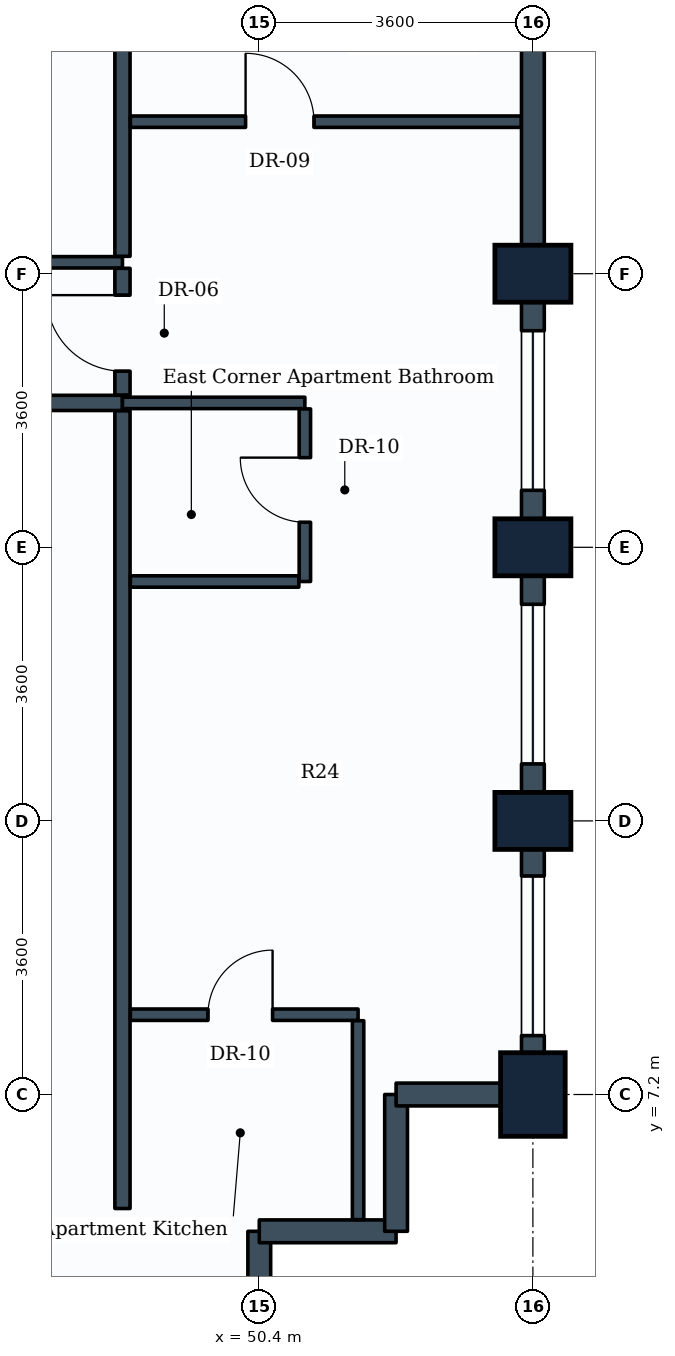
"""IFC4 building model, lengths in metres.
Left out: names, types, materials, properties, quantities, classifications, styles, units other than length and angle.
Written with IfcOpenShell. Run it as: python <this file> out.ifc"""

import sys

from ifc_helpers import new_model, si_unit, direction, frame, frame_2d, origin, origin_2d, place, context, subcontext, project, spatial, rectangle, extrude, element, fill, save


model = new_model("IFC4")
c1 = context("Model", 3, precision=1e-05, world=origin(), true_north=direction((0.0, 1.0)))
c2 = subcontext(c1, "Body", "Model", "MODEL_VIEW")
j1 = project(units=[si_unit("LENGTHUNIT", "METRE"), si_unit("PLANEANGLEUNIT", "RADIAN")], contexts=[c1])
p1 = place(None, origin())
s1 = spatial("IfcSite", under=j1, at=p1, CompositionType="ELEMENT")
p2 = place(p1, origin())
s2 = spatial("IfcBuilding", under=s1, at=p2, CompositionType="ELEMENT")
p3 = place(p2, frame((0.0, 0.0, 131.4)))
s3 = spatial("IfcBuildingStorey", under=s2, at=p3, CompositionType="ELEMENT", Elevation=131.4)
p4 = place(p3, frame((54.0, 7.2, 0.0), z_axis=(0.0, 0.0, 1.0), x_axis=(1.0, 0.0, 0.0)))
e1 = element("IfcColumn", 1, at=p4, inside=s3, PredefinedType="COLUMN", context=c2, shape_type="SweptSolid", body=[
    extrude(rectangle(XDim=0.85, YDim=1.1, at=origin_2d()), origin(), (0.0, 0.0, 1.0), 3.8),
])
for number, where, z_axis, x_axis in (
    (2, (54.0, 10.8, 0.0), (0.0, 0.0, 1.0), (0.0, 1.0, 0.0)),
    (3, (54.0, 14.4, 0.0), (0.0, 0.0, 1.0), (0.0, 1.0, 0.0)),
    (4, (54.0, 18.0, 0.0), (0.0, 0.0, 1.0), (0.0, 1.0, 0.0)),
):
    element("IfcColumn", number, at=place(p3, frame(where, z_axis=z_axis, x_axis=x_axis)), inside=s3, PredefinedType="COLUMN", context=c2, shape_type="SweptSolid", body=[
        extrude(rectangle(XDim=0.75, YDim=1.0, at=origin_2d()), origin(), (0.0, 0.0, 1.0), 3.8),
    ])
p5 = place(p3, frame((50.4, 5.4, 0.0), z_axis=(0.0, 0.0, 1.0), x_axis=(0.0, -1.0, 0.0)))
e5 = element("IfcWall", 5, at=p5, inside=s3, PredefinedType="STANDARD", context=c2, shape_type="SweptSolid", body=[
    extrude(rectangle(XDim=1.8, YDim=0.3, at=frame_2d((0.9, 0.0))), origin(), (0.0, 0.0, 1.0), 2.93),
])
for number, where, z_axis, x_axis in (
    (6, (52.2, 5.4, 0.0), (0.0, 0.0, 1.0), (-1.0, 0.0, 0.0)),
    (7, (52.2, 7.2, 0.0), (0.0, 0.0, 1.0), (0.0, -1.0, 0.0)),
):
    element("IfcWall", number, at=place(p3, frame(where, z_axis=z_axis, x_axis=x_axis)), inside=s3, PredefinedType="STANDARD", context=c2, shape_type="SweptSolid", body=[
        extrude(rectangle(XDim=1.8, YDim=0.3, at=frame_2d((0.9, 0.0))), origin(), (0.0, 0.0, 1.0), 3.535),
    ])
p6 = place(p3, frame((54.0, 7.2, 0.0), z_axis=(0.0, 0.0, 1.0), x_axis=(-1.0, 0.0, 0.0)))
e8 = element("IfcWall", 8, at=p6, inside=s3, PredefinedType="STANDARD", context=c2, shape_type="SweptSolid", body=[
    extrude(rectangle(XDim=1.8, YDim=0.3, at=frame_2d((0.9, 0.0))), origin(), (0.0, 0.0, 1.0), 2.93),
])
p7 = place(p3, frame((54.0, 10.8, 0.0), z_axis=(0.0, 0.0, 1.0), x_axis=(0.0, -1.0, 0.0)))
e9 = element("IfcWall", 9, at=p7, inside=s3, PredefinedType="STANDARD", context=c2, shape_type="SweptSolid", body=[
    extrude(rectangle(XDim=3.6, YDim=0.3, at=frame_2d((1.8, 0.0))), origin(), (0.0, 0.0, 1.0), 2.93),
])
p8 = place(p7, frame((0.725, 0.0, 0.85)))
e10 = element("IfcOpeningElement", 10, at=p8, cuts=e9, PredefinedType="OPENING", context=c2, shape_type="SweptSolid", body=[
    extrude(rectangle(XDim=2.1, YDim=1.35, at=frame_2d((1.05, 0.675))), frame((0.0, 0.16, 0.0), z_axis=(0.0, -1.0, 0.0), x_axis=(1.0, 0.0, 0.0)), (0.0, 0.0, 1.0), 0.32),
])
p9 = place(p3, frame((54.0, 14.4, 0.0), z_axis=(0.0, 0.0, 1.0), x_axis=(0.0, -1.0, 0.0)))
e11 = element("IfcWall", 11, at=p9, inside=s3, PredefinedType="STANDARD", context=c2, shape_type="SweptSolid", body=[
    extrude(rectangle(XDim=3.6, YDim=0.3, at=frame_2d((1.8, 0.0))), origin(), (0.0, 0.0, 1.0), 2.93),
])
p10 = place(p9, frame((0.75, 0.0, 0.85)))
e12 = element("IfcOpeningElement", 12, at=p10, cuts=e11, PredefinedType="OPENING", context=c2, shape_type="SweptSolid", body=[
    extrude(rectangle(XDim=2.1, YDim=1.35, at=frame_2d((1.05, 0.675))), frame((0.0, 0.16, 0.0), z_axis=(0.0, -1.0, 0.0), x_axis=(1.0, 0.0, 0.0)), (0.0, 0.0, 1.0), 0.32),
])
p11 = place(p3, frame((54.0, 18.0, 0.0), z_axis=(0.0, 0.0, 1.0), x_axis=(0.0, -1.0, 0.0)))
e13 = element("IfcWall", 13, at=p11, inside=s3, PredefinedType="STANDARD", context=c2, shape_type="SweptSolid", body=[
    extrude(rectangle(XDim=3.6, YDim=0.3, at=frame_2d((1.8, 0.0))), origin(), (0.0, 0.0, 1.0), 2.93),
])
p12 = place(p11, frame((0.75, 0.0, 0.85)))
e14 = element("IfcOpeningElement", 14, at=p12, cuts=e13, PredefinedType="OPENING", context=c2, shape_type="SweptSolid", body=[
    extrude(rectangle(XDim=2.1, YDim=1.35, at=frame_2d((1.05, 0.675))), frame((0.0, 0.16, 0.0), z_axis=(0.0, -1.0, 0.0), x_axis=(1.0, 0.0, 0.0)), (0.0, 0.0, 1.0), 0.32),
])
p13 = place(p3, frame((54.0, 21.6, 0.0), z_axis=(0.0, 0.0, 1.0), x_axis=(0.0, -1.0, 0.0)))
e15 = element("IfcWall", 15, at=p13, inside=s3, PredefinedType="STANDARD", context=c2, shape_type="SweptSolid", body=[
    extrude(rectangle(XDim=3.6, YDim=0.3, at=frame_2d((1.8, 0.0))), origin(), (0.0, 0.0, 1.0), 2.93),
])
p14 = place(p3, frame((45.68, 16.3, 0.0), z_axis=(0.0, 0.0, 1.0), x_axis=(1.0, 0.0, 0.0)))
e16 = element("IfcWall", 16, at=p14, inside=s3, PredefinedType="PARTITIONING", context=c2, shape_type="SweptSolid", body=[
    extrude(rectangle(XDim=2.92, YDim=0.2, at=frame_2d((1.46, 0.0))), origin(), (0.0, 0.0, 1.0), 3.17),
])
p15 = place(p3, frame((43.904, 18.15, 0.0), z_axis=(0.0, 0.0, 1.0), x_axis=(1.0, 0.0, 0.0)))
e17 = element("IfcWall", 17, at=p15, inside=s3, PredefinedType="PARTITIONING", context=c2, shape_type="SweptSolid", body=[
    extrude(rectangle(XDim=4.696, YDim=0.15, at=frame_2d((2.348, 0.0))), origin(), (0.0, 0.0, 1.0), 3.17),
])
p16 = place(p15, frame((1.757, 0.0, 0.0)))
e18 = element("IfcOpeningElement", 18, at=p16, cuts=e17, PredefinedType="OPENING", context=c2, shape_type="SweptSolid", body=[
    extrude(rectangle(XDim=1.0, YDim=2.1, at=frame_2d((0.5, 1.05))), frame((0.0, 0.085, 0.0), z_axis=(0.0, -1.0, 0.0), x_axis=(1.0, 0.0, 0.0)), (0.0, 0.0, 1.0), 0.17),
])
p17 = place(p3, frame((48.6, 5.7, 0.0), z_axis=(0.0, 0.0, 1.0), x_axis=(0.0, 1.0, 0.0)))
e19 = element("IfcWall", 19, at=p17, inside=s3, PredefinedType="PARTITIONING", context=c2, shape_type="SweptSolid", body=[
    extrude(rectangle(XDim=10.496, YDim=0.2, at=frame_2d((5.248, 0.0))), origin(), (0.0, 0.0, 1.0), 3.17),
])
p18 = place(p3, frame((48.6, 18.229, 0.0), z_axis=(0.0, 0.0, 1.0), x_axis=(0.0, 1.0, 0.0)))
e20 = element("IfcWall", 20, at=p18, inside=s3, PredefinedType="PARTITIONING", context=c2, shape_type="SweptSolid", body=[
    extrude(rectangle(XDim=6.817, YDim=0.2, at=frame_2d((3.408, 0.0))), origin(), (0.0, 0.0, 1.0), 2.93),
])
p19 = place(p3, frame((48.6, 16.404, 0.0), z_axis=(0.0, 0.0, 1.0), x_axis=(0.0, 1.0, 0.0)))
e21 = element("IfcWall", 21, at=p19, inside=s3, PredefinedType="PARTITIONING", context=c2, shape_type="SweptSolid", body=[
    extrude(rectangle(XDim=1.667, YDim=0.2, at=frame_2d((0.833, 0.0))), origin(), (0.0, 0.0, 1.0), 3.535),
])
p20 = place(p19, frame((0.314, 0.0, 0.0)))
e22 = element("IfcOpeningElement", 22, at=p20, cuts=e21, PredefinedType="OPENING", context=c2, shape_type="SweptSolid", body=[
    extrude(rectangle(XDim=1.0, YDim=2.1, at=frame_2d((0.5, 1.05))), frame((0.0, 0.11, 0.0), z_axis=(0.0, -1.0, 0.0), x_axis=(1.0, 0.0, 0.0)), (0.0, 0.0, 1.0), 0.22),
])
p21 = place(p3, frame((48.6, 16.3, 0.0), z_axis=(0.0, 0.0, 1.0), x_axis=(1.0, 0.0, 0.0)))
e23 = element("IfcWall", 23, at=p21, inside=s3, PredefinedType="PARTITIONING", context=c2, shape_type="SweptSolid", body=[
    extrude(rectangle(XDim=2.4, YDim=0.15, at=frame_2d((1.2, 0.0))), origin(), (0.0, 0.0, 1.0), 3.535),
])
p22 = place(p3, frame((51.0, 13.95, 0.0), z_axis=(0.0, 0.0, 1.0), x_axis=(0.0, 1.0, 0.0)))
e24 = element("IfcWall", 24, at=p22, inside=s3, PredefinedType="PARTITIONING", context=c2, shape_type="SweptSolid", body=[
    extrude(rectangle(XDim=2.271, YDim=0.15, at=frame_2d((1.135, 0.0))), origin(), (0.0, 0.0, 1.0), 3.17),
])
p23 = place(p22, frame((0.78, 0.0, 0.0)))
e25 = element("IfcOpeningElement", 25, at=p23, cuts=e24, PredefinedType="OPENING", context=c2, shape_type="SweptSolid", body=[
    extrude(rectangle(XDim=0.85, YDim=2.1, at=frame_2d((0.425, 1.05))), frame((0.0, 0.085, 0.0), z_axis=(0.0, -1.0, 0.0), x_axis=(1.0, 0.0, 0.0)), (0.0, 0.0, 1.0), 0.17),
])
p24 = place(p3, frame((48.704, 13.95, 0.0), z_axis=(0.0, 0.0, 1.0), x_axis=(1.0, 0.0, 0.0)))
e26 = element("IfcWall", 26, at=p24, inside=s3, PredefinedType="PARTITIONING", context=c2, shape_type="SweptSolid", body=[
    extrude(rectangle(XDim=2.217, YDim=0.15, at=frame_2d((1.108, 0.0))), origin(), (0.0, 0.0, 1.0), 3.535),
])
p25 = place(p3, frame((48.704, 20.0, 0.0), z_axis=(0.0, 0.0, 1.0), x_axis=(1.0, 0.0, 0.0)))
e27 = element("IfcWall", 27, at=p25, inside=s3, PredefinedType="PARTITIONING", context=c2, shape_type="SweptSolid", body=[
    extrude(rectangle(XDim=5.142, YDim=0.15, at=frame_2d((2.571, 0.0))), origin(), (0.0, 0.0, 1.0), 2.93),
])
p26 = place(p25, frame((1.516, 0.0, 0.0)))
e28 = element("IfcOpeningElement", 28, at=p26, cuts=e27, PredefinedType="OPENING", context=c2, shape_type="SweptSolid", body=[
    extrude(rectangle(XDim=0.9, YDim=2.1, at=frame_2d((0.45, 1.05))), frame((0.0, 0.085, 0.0), z_axis=(0.0, -1.0, 0.0), x_axis=(1.0, 0.0, 0.0)), (0.0, 0.0, 1.0), 0.17),
])
p27 = place(p3, frame((48.704, 8.25, 0.0), z_axis=(0.0, 0.0, 1.0), x_axis=(1.0, 0.0, 0.0)))
e29 = element("IfcWall", 29, at=p27, inside=s3, PredefinedType="PARTITIONING", context=c2, shape_type="SweptSolid", body=[
    extrude(rectangle(XDim=2.996, YDim=0.15, at=frame_2d((1.498, 0.0))), origin(), (0.0, 0.0, 1.0), 3.535),
])
p28 = place(p27, frame((1.021, 0.0, 0.0)))
e30 = element("IfcOpeningElement", 30, at=p28, cuts=e29, PredefinedType="OPENING", context=c2, shape_type="SweptSolid", body=[
    extrude(rectangle(XDim=0.85, YDim=2.1, at=frame_2d((0.425, 1.05))), frame((0.0, 0.085, 0.0), z_axis=(0.0, -1.0, 0.0), x_axis=(1.0, 0.0, 0.0)), (0.0, 0.0, 1.0), 0.17),
])
p29 = place(p3, frame((51.7, 5.554, 0.0), z_axis=(0.0, 0.0, 1.0), x_axis=(0.0, 1.0, 0.0)))
e31 = element("IfcWall", 31, at=p29, inside=s3, PredefinedType="PARTITIONING", context=c2, shape_type="SweptSolid", body=[
    extrude(rectangle(XDim=2.617, YDim=0.15, at=frame_2d((1.309, 0.0))), origin(), (0.0, 0.0, 1.0), 3.535),
])
p30 = place(p8, origin())
e32 = element("IfcWindow", 32, at=p30, inside=s3, PartitioningType="SINGLE_PANEL", PredefinedType="WINDOW", context=c2, shape_type="SweptSolid", body=[
    extrude(rectangle(XDim=2.1, YDim=1.35, at=frame_2d((1.05, 0.675))), frame((0.0, 0.03, 0.0), z_axis=(0.0, -1.0, 0.0), x_axis=(1.0, 0.0, 0.0)), (0.0, 0.0, 1.0), 0.06),
])
fill(e10, e32)
p31 = place(p10, origin())
e33 = element("IfcWindow", 33, at=p31, inside=s3, PartitioningType="SINGLE_PANEL", PredefinedType="WINDOW", context=c2, shape_type="SweptSolid", body=[
    extrude(rectangle(XDim=2.1, YDim=1.35, at=frame_2d((1.05, 0.675))), frame((0.0, 0.03, 0.0), z_axis=(0.0, -1.0, 0.0), x_axis=(1.0, 0.0, 0.0)), (0.0, 0.0, 1.0), 0.06),
])
fill(e12, e33)
p32 = place(p12, origin())
e34 = element("IfcWindow", 34, at=p32, inside=s3, PartitioningType="SINGLE_PANEL", PredefinedType="WINDOW", context=c2, shape_type="SweptSolid", body=[
    extrude(rectangle(XDim=2.1, YDim=1.35, at=frame_2d((1.05, 0.675))), frame((0.0, 0.03, 0.0), z_axis=(0.0, -1.0, 0.0), x_axis=(1.0, 0.0, 0.0)), (0.0, 0.0, 1.0), 0.06),
])
fill(e14, e34)
p33 = place(p20, origin())
e35 = element("IfcDoor", 35, at=p33, inside=s3, OperationType="SINGLE_SWING_RIGHT", PredefinedType="DOOR", context=c2, shape_type="SweptSolid", body=[
    extrude(rectangle(XDim=1.0, YDim=2.1, at=frame_2d((0.5, 1.05))), frame((0.0, 0.025, 0.0), z_axis=(0.0, -1.0, 0.0), x_axis=(1.0, 0.0, 0.0)), (0.0, 0.0, 1.0), 0.05),
])
fill(e22, e35)
p34 = place(p23, origin())
e36 = element("IfcDoor", 36, at=p34, inside=s3, OperationType="SINGLE_SWING_RIGHT", PredefinedType="DOOR", context=c2, shape_type="SweptSolid", body=[
    extrude(rectangle(XDim=0.85, YDim=2.1, at=frame_2d((0.425, 1.05))), frame((0.0, 0.025, 0.0), z_axis=(0.0, -1.0, 0.0), x_axis=(1.0, 0.0, 0.0)), (0.0, 0.0, 1.0), 0.05),
])
fill(e25, e36)
p35 = place(p26, origin())
e37 = element("IfcDoor", 37, at=p35, inside=s3, OperationType="SINGLE_SWING_LEFT", PredefinedType="DOOR", context=c2, shape_type="SweptSolid", body=[
    extrude(rectangle(XDim=0.9, YDim=2.1, at=frame_2d((0.45, 1.05))), frame((0.0, 0.025, 0.0), z_axis=(0.0, -1.0, 0.0), x_axis=(1.0, 0.0, 0.0)), (0.0, 0.0, 1.0), 0.05),
])
fill(e28, e37)
p36 = place(p28, origin())
e38 = element("IfcDoor", 38, at=p36, inside=s3, OperationType="SINGLE_SWING_RIGHT", PredefinedType="DOOR", context=c2, shape_type="SweptSolid", body=[
    extrude(rectangle(XDim=0.85, YDim=2.1, at=frame_2d((0.425, 1.05))), frame((0.0, 0.025, 0.0), z_axis=(0.0, -1.0, 0.0), x_axis=(1.0, 0.0, 0.0)), (0.0, 0.0, 1.0), 0.05),
])
fill(e30, e38)
save(model, sys.argv[1])
